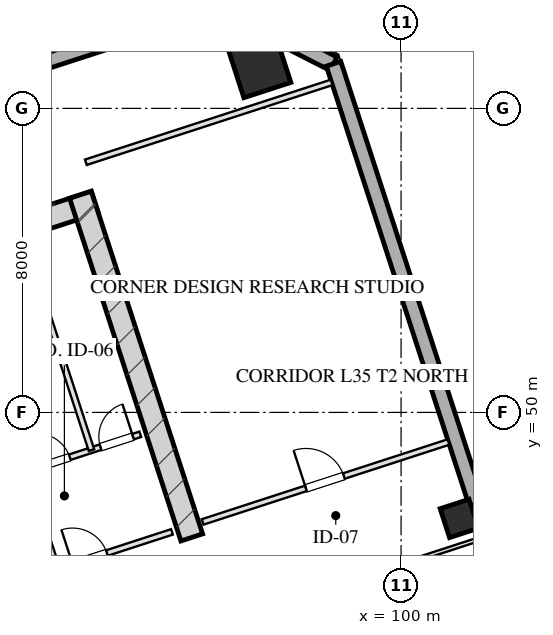
"""IFC4 building model, lengths in metres.
Left out: names, types, materials, properties, quantities, classifications, styles, units other than length and angle.
Written with IfcOpenShell. Run it as: python <this file> out.ifc"""

import sys

from ifc_helpers import new_model, si_unit, direction, frame, frame_2d, origin, origin_2d, place, context, subcontext, project, spatial, rectangle, hollow_rectangle, extrude, element, fill, save


model = new_model("IFC4")
c1 = context("Model", 3, precision=1e-05, world=origin(), true_north=direction((0.0, 1.0)))
c2 = subcontext(c1, "Body", "Model", "MODEL_VIEW")
j1 = project(units=[si_unit("LENGTHUNIT", "METRE"), si_unit("PLANEANGLEUNIT", "RADIAN")], contexts=[c1])
p1 = place(None, origin())
s1 = spatial("IfcSite", under=j1, at=p1, CompositionType="ELEMENT")
p2 = place(p1, origin())
s2 = spatial("IfcBuilding", under=s1, at=p2, CompositionType="ELEMENT")
p3 = place(p2, frame((0.0, 0.0, 134.55)))
s3 = spatial("IfcBuildingStorey", under=s2, at=p3, CompositionType="ELEMENT", Elevation=134.55)
p4 = place(p3, frame((76.344, 50.466, 0.0), z_axis=(0.0, 0.0, 1.0), x_axis=(0.951055727519, 0.309019421968, 0.0)))
e1 = element("IfcWall", 1, at=p4, inside=s3, PredefinedType="SHEAR", context=c2, shape_type="SweptSolid", body=[
    extrude(rectangle(XDim=16.4, YDim=0.6, at=frame_2d((8.2, 0.0))), origin(), (0.0, 0.0, 1.0), 3.45),
])
p5 = place(p3, frame((94.492, 46.71, 0.0), z_axis=(0.0, 0.0, 1.0), x_axis=(-0.309010370028, 0.95105866865, 0.0)))
e2 = element("IfcWall", 2, at=p5, inside=s3, PredefinedType="SHEAR", context=c2, shape_type="SweptSolid", body=[
    extrude(rectangle(XDim=9.48, YDim=0.6, at=frame_2d((4.74, 0.0))), origin(), (0.0, 0.0, 1.0), 3.45),
])
p6 = place(p3, frame((96.281, 59.099, 0.0), z_axis=(0.0, 0.0, 1.0), x_axis=(0.951056516295, 0.309016994375, 0.0)))
e3 = element("IfcColumn", 3, at=p6, inside=s3, PredefinedType="COLUMN", context=c2, shape_type="SweptSolid", body=[
    extrude(hollow_rectangle(XDim=1.3, YDim=1.3, WallThickness=0.045, at=origin_2d()), origin(), (0.0, 0.0, 1.0), 3.451),
])
p7 = place(p3, frame((101.532, 47.21, 0.0), z_axis=(0.0, 0.0, 1.0), x_axis=(0.951056516295, 0.309016994375, 0.0)))
e4 = element("IfcColumn", 4, at=p7, inside=s3, PredefinedType="COLUMN", context=c2, shape_type="SweptSolid", body=[
    extrude(hollow_rectangle(XDim=0.8, YDim=0.8, WallThickness=0.028, at=origin_2d()), origin(), (0.0, 0.0, 1.0), 3.451),
])
p8 = place(p3, frame((70.092, 52.556, 0.0), z_axis=(0.0, 0.0, 1.0), x_axis=(0.951057580055, 0.30901372044, 0.0)))
e5 = element("IfcWall", 5, at=p8, inside=s3, PredefinedType="SOLIDWALL", context=c2, shape_type="SweptSolid", body=[
    extrude(rectangle(XDim=26.4, YDim=0.4, at=frame_2d((13.2, 0.0))), origin(), (0.0, 0.0, 1.0), 2.55),
])
p9 = place(p3, frame((95.199, 60.714, 0.0), z_axis=(0.0, 0.0, 1.0), x_axis=(0.891020832027, -0.453962417932, 0.0)))
e6 = element("IfcWall", 6, at=p9, inside=s3, PredefinedType="SOLIDWALL", context=c2, shape_type="SweptSolid", body=[
    extrude(rectangle(XDim=3.394, YDim=0.4, at=frame_2d((1.697, 0.0))), origin(), (0.0, 0.0, 1.0), 2.55),
])
p10 = place(p3, frame((98.224, 59.173, 0.0), z_axis=(0.0, 0.0, 1.0), x_axis=(0.309014228706, -0.951057414911, 0.0)))
e7 = element("IfcWall", 7, at=p10, inside=s3, PredefinedType="SOLIDWALL", context=c2, shape_type="SweptSolid", body=[
    extrude(rectangle(XDim=42.8, YDim=0.4, at=frame_2d((21.4, 0.0))), origin(), (0.0, 0.0, 1.0), 2.55),
])
p11 = place(p10, frame((18.25, 0.0, 0.0)))
e8 = element("IfcOpeningElement", 8, at=p11, cuts=e7, PredefinedType="OPENING", context=c2, shape_type="SweptSolid", body=[
    extrude(rectangle(XDim=1.1, YDim=2.15, at=frame_2d((0.55, 1.075))), frame((0.0, 0.21, 0.0), z_axis=(0.0, -1.0, 0.0), x_axis=(1.0, 0.0, 0.0)), (0.0, 0.0, 1.0), 0.42),
])
p12 = place(p3, frame((90.928, 45.868, 0.0), z_axis=(0.0, 0.0, 1.0), x_axis=(-0.309042196757, 0.951048327176, 0.0)))
e9 = element("IfcWall", 9, at=p12, inside=s3, PredefinedType="PARTITIONING", context=c2, shape_type="SweptSolid", body=[
    extrude(rectangle(XDim=8.43, YDim=0.2, at=frame_2d((4.215, 0.0))), origin(), (0.0, 0.0, 1.0), 3.155),
])
p13 = place(p3, frame((90.928, 45.868, 0.0), z_axis=(0.0, 0.0, 1.0), x_axis=(0.951059297078, 0.309008435874, 0.0)))
e10 = element("IfcWall", 10, at=p13, inside=s3, PredefinedType="PARTITIONING", context=c2, shape_type="SweptSolid", body=[
    extrude(rectangle(XDim=3.2, YDim=0.15, at=frame_2d((1.6, 0.0))), origin(), (0.0, 0.0, 1.0), 3.155),
])
p14 = place(p13, frame((0.45, 0.0, 0.0)))
e11 = element("IfcOpeningElement", 11, at=p14, cuts=e10, PredefinedType="OPENING", context=c2, shape_type="SweptSolid", body=[
    extrude(rectangle(XDim=0.95, YDim=2.05, at=frame_2d((0.475, 1.025))), frame((0.0, 0.085, 0.0), z_axis=(0.0, -1.0, 0.0), x_axis=(1.0, 0.0, 0.0)), (0.0, 0.0, 1.0), 0.17),
])
p15 = place(p3, frame((90.094, 48.436, 0.0), z_axis=(0.0, 0.0, 1.0), x_axis=(0.951066581729, 0.308986014439, 0.0)))
e12 = element("IfcWall", 12, at=p15, inside=s3, PredefinedType="PARTITIONING", context=c2, shape_type="SweptSolid", body=[
    extrude(rectangle(XDim=3.2, YDim=0.15, at=frame_2d((1.6, 0.0))), origin(), (0.0, 0.0, 1.0), 3.155),
])
p16 = place(p15, frame((0.35, 0.0, 0.0)))
e13 = element("IfcOpeningElement", 13, at=p16, cuts=e12, PredefinedType="OPENING", context=c2, shape_type="SweptSolid", body=[
    extrude(rectangle(XDim=0.9, YDim=2.05, at=frame_2d((0.45, 1.025))), frame((0.0, 0.085, 0.0), z_axis=(0.0, -1.0, 0.0), x_axis=(1.0, 0.0, 0.0)), (0.0, 0.0, 1.0), 0.17),
])
p17 = place(p15, frame((2.1, 0.0, 0.0)))
e14 = element("IfcOpeningElement", 14, at=p17, cuts=e12, PredefinedType="OPENING", context=c2, shape_type="SweptSolid", body=[
    extrude(rectangle(XDim=0.9, YDim=2.05, at=frame_2d((0.45, 1.025))), frame((0.0, 0.085, 0.0), z_axis=(0.0, -1.0, 0.0), x_axis=(1.0, 0.0, 0.0)), (0.0, 0.0, 1.0), 0.17),
])
p18 = place(p3, frame((91.853, 49.007, 0.0), z_axis=(0.0, 0.0, 1.0), x_axis=(-0.309022487551, 0.951054731437, 0.0)))
e15 = element("IfcWall", 15, at=p18, inside=s3, PredefinedType="PARTITIONING", context=c2, shape_type="SweptSolid", body=[
    extrude(rectangle(XDim=5.73, YDim=0.15, at=frame_2d((2.865, 0.0))), origin(), (0.0, 0.0, 1.0), 3.155),
])
p19 = place(p3, frame((91.705, 56.582, 0.0), z_axis=(0.0, 0.0, 1.0), x_axis=(0.951057811516, 0.309013008068, 0.0)))
e16 = element("IfcWall", 16, at=p19, inside=s3, PredefinedType="PARTITIONING", context=c2, shape_type="SweptSolid", body=[
    extrude(rectangle(XDim=6.8, YDim=0.15, at=frame_2d((3.4, 0.0))), origin(), (0.0, 0.0, 1.0), 3.155),
])
p20 = place(p3, frame((94.78, 47.119, 0.0), z_axis=(0.0, 0.0, 1.0), x_axis=(0.951057811516, 0.309013008068, 0.0)))
e17 = element("IfcWall", 17, at=p20, inside=s3, PredefinedType="PARTITIONING", context=c2, shape_type="SweptSolid", body=[
    extrude(rectangle(XDim=6.8, YDim=0.15, at=frame_2d((3.4, 0.0))), origin(), (0.0, 0.0, 1.0), 3.155),
])
p21 = place(p20, frame((2.856, 0.0, 0.0)))
e18 = element("IfcOpeningElement", 18, at=p21, cuts=e17, PredefinedType="OPENING", context=c2, shape_type="SweptSolid", body=[
    extrude(rectangle(XDim=1.05, YDim=2.05, at=frame_2d((0.525, 1.025))), frame((0.0, 0.085, 0.0), z_axis=(0.0, -1.0, 0.0), x_axis=(1.0, 0.0, 0.0)), (0.0, 0.0, 1.0), 0.17),
])
p22 = place(p3, frame((96.369, 44.818, 0.0), z_axis=(0.0, 0.0, 1.0), x_axis=(0.95106067854, 0.309004184009, 0.0)))
e19 = element("IfcWall", 19, at=p22, inside=s3, PredefinedType="MOVABLE", context=c2, shape_type="SweptSolid", body=[
    extrude(rectangle(XDim=6.0, YDim=0.1, at=frame_2d((3.0, 0.0))), origin(), (0.0, 0.0, 1.0), 3.155),
])
p23 = place(p14, origin())
e20 = element("IfcDoor", 20, at=p23, inside=s3, OperationType="SINGLE_SWING_LEFT", PredefinedType="DOOR", context=c2, shape_type="SweptSolid", body=[
    extrude(rectangle(XDim=0.95, YDim=2.05, at=frame_2d((0.475, 1.025))), frame((0.0, 0.025, 0.0), z_axis=(0.0, -1.0, 0.0), x_axis=(1.0, 0.0, 0.0)), (0.0, 0.0, 1.0), 0.05),
])
fill(e11, e20)
p24 = place(p16, origin())
e21 = element("IfcDoor", 21, at=p24, inside=s3, OperationType="SINGLE_SWING_LEFT", PredefinedType="DOOR", context=c2, shape_type="SweptSolid", body=[
    extrude(rectangle(XDim=0.9, YDim=2.05, at=frame_2d((0.45, 1.025))), frame((0.0, 0.025, 0.0), z_axis=(0.0, -1.0, 0.0), x_axis=(1.0, 0.0, 0.0)), (0.0, 0.0, 1.0), 0.05),
])
fill(e13, e21)
p25 = place(p17, origin())
e22 = element("IfcDoor", 22, at=p25, inside=s3, OperationType="SINGLE_SWING_RIGHT", PredefinedType="DOOR", context=c2, shape_type="SweptSolid", body=[
    extrude(rectangle(XDim=0.9, YDim=2.05, at=frame_2d((0.45, 1.025))), frame((0.0, 0.025, 0.0), z_axis=(0.0, -1.0, 0.0), x_axis=(1.0, 0.0, 0.0)), (0.0, 0.0, 1.0), 0.05),
])
fill(e14, e22)
p26 = place(p21, origin())
e23 = element("IfcDoor", 23, at=p26, inside=s3, OperationType="SINGLE_SWING_LEFT", PredefinedType="DOOR", context=c2, shape_type="SweptSolid", body=[
    extrude(rectangle(XDim=1.05, YDim=2.05, at=frame_2d((0.525, 1.025))), frame((0.0, 0.025, 0.0), z_axis=(0.0, -1.0, 0.0), x_axis=(1.0, 0.0, 0.0)), (0.0, 0.0, 1.0), 0.05),
])
fill(e18, e23)
save(model, sys.argv[1])
